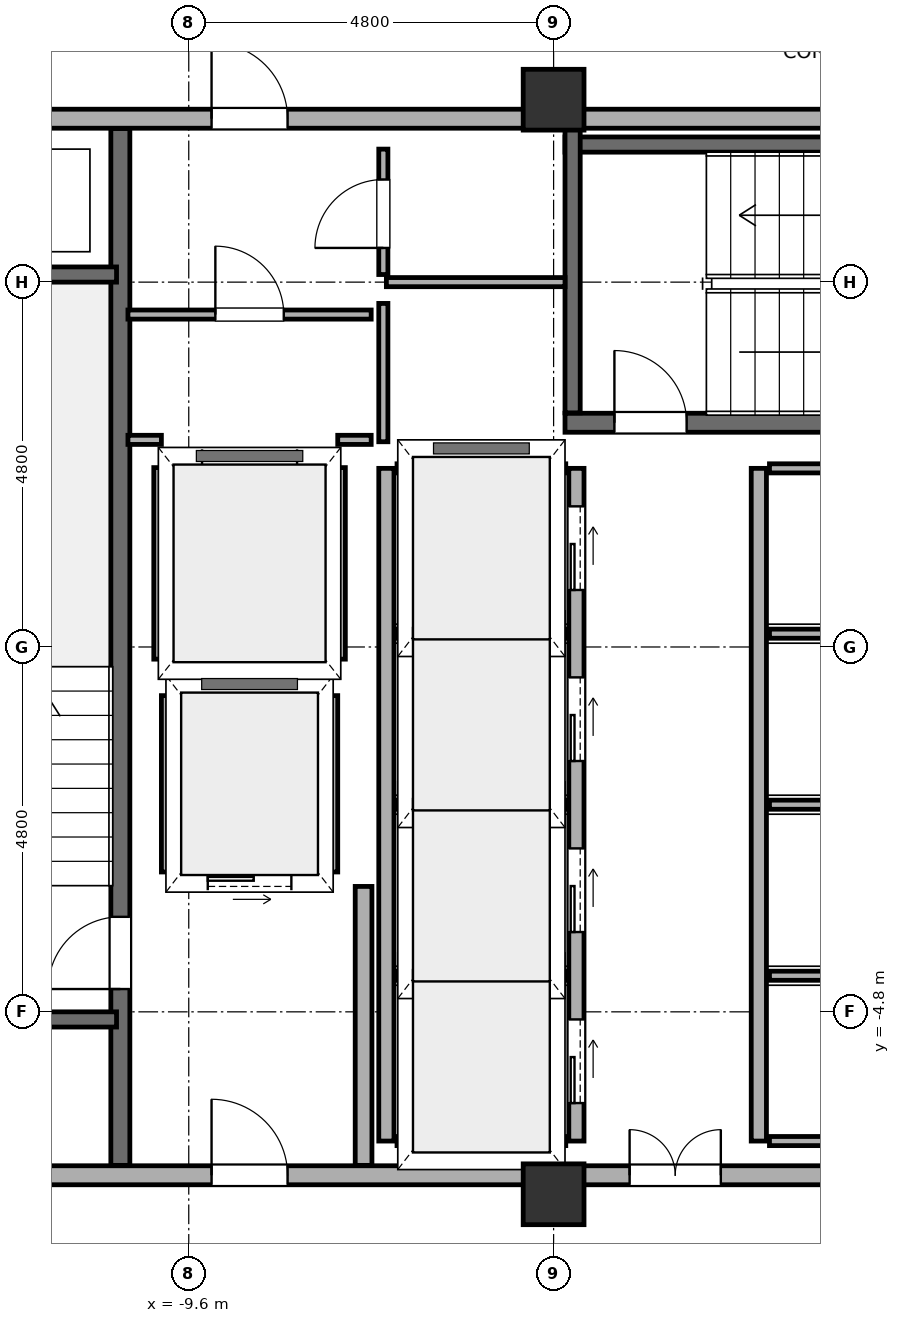
"""IFC4 building model, lengths in metres.
Left out: names, types, materials, properties, quantities, classifications, styles, units other than length and angle.
Written with IfcOpenShell. Run it as: python <this file> out.ifc"""

import sys

from ifc_helpers import new_model, si_unit, direction, frame, frame_2d, origin, origin_2d, place, context, subcontext, project, spatial, rectangle, hollow_rectangle, extrude, element, fill, save


model = new_model("IFC4")
c1 = context("Model", 3, precision=1e-05, world=origin(), true_north=direction((0.0, 1.0)))
c2 = subcontext(c1, "Body", "Model", "MODEL_VIEW")
j1 = project(units=[si_unit("LENGTHUNIT", "METRE"), si_unit("PLANEANGLEUNIT", "RADIAN")], contexts=[c1])
p1 = place(None, origin())
s1 = spatial("IfcSite", under=j1, at=p1, CompositionType="ELEMENT")
p2 = place(p1, origin())
s2 = spatial("IfcBuilding", under=s1, at=p2, CompositionType="ELEMENT")
p3 = place(p2, frame((0.0, 0.0, 85.5)))
s3 = spatial("IfcBuildingStorey", under=s2, at=p3, CompositionType="ELEMENT", Elevation=85.5)
for number, where, z_axis, x_axis in (
    (1, (-4.8, -7.2, 0.0), (0.0, 0.0, 1.0), (1.0, 0.0, 0.0)),
    (2, (-4.8, 7.2, 0.0), (0.0, 0.0, 1.0), (1.0, 0.0, 0.0)),
):
    element("IfcColumn", number, at=place(p3, frame(where, z_axis=z_axis, x_axis=x_axis)), inside=s3, PredefinedType="COLUMN", context=c2, shape_type="SweptSolid", body=[
        extrude(hollow_rectangle(XDim=0.8, YDim=0.8, WallThickness=0.036, at=origin_2d()), origin(), (0.0, 0.0, 1.0), 3.7),
    ])
p4 = place(p3, frame((-14.2, -6.95, 0.0), z_axis=(0.0, 0.0, 1.0), x_axis=(1.0, 0.0, 0.0)))
e3 = element("IfcWall", 3, at=p4, inside=s3, PredefinedType="SOLIDWALL", context=c2, shape_type="SweptSolid", body=[
    extrude(rectangle(XDim=9.4, YDim=0.25, at=frame_2d((4.7, 0.0))), origin(), (0.0, 0.0, 1.0), 2.05),
])
p5 = place(p4, frame((4.9, 0.0, 0.0)))
e4 = element("IfcOpeningElement", 4, at=p5, cuts=e3, PredefinedType="OPENING", context=c2, shape_type="SweptSolid", body=[
    extrude(rectangle(XDim=1.0, YDim=2.02, at=frame_2d((0.5, 1.01))), frame((0.0, 0.14, 0.0), z_axis=(0.0, -1.0, 0.0), x_axis=(1.0, 0.0, 0.0)), (0.0, 0.0, 1.0), 0.28),
])
p6 = place(p3, frame((-4.6, -6.95, 0.0), z_axis=(0.0, 0.0, 1.0), x_axis=(1.0, 0.0, 0.0)))
e5 = element("IfcWall", 5, at=p6, inside=s3, PredefinedType="SOLIDWALL", context=c2, shape_type="SweptSolid", body=[
    extrude(rectangle(XDim=9.2, YDim=0.25, at=frame_2d((4.6, 0.0))), origin(), (0.0, 0.0, 1.0), 2.25),
])
p7 = place(p6, frame((0.8, 0.0, 0.0)))
e6 = element("IfcOpeningElement", 6, at=p7, cuts=e5, PredefinedType="OPENING", context=c2, shape_type="SweptSolid", body=[
    extrude(rectangle(XDim=1.2, YDim=2.02, at=frame_2d((0.6, 1.01))), frame((0.0, 0.14, 0.0), z_axis=(0.0, -1.0, 0.0), x_axis=(1.0, 0.0, 0.0)), (0.0, 0.0, 1.0), 0.28),
])
p8 = place(p6, frame((5.55, 0.0, 0.0)))
e7 = element("IfcOpeningElement", 7, at=p8, cuts=e5, PredefinedType="OPENING", context=c2, shape_type="SweptSolid", body=[
    extrude(rectangle(XDim=1.2, YDim=2.02, at=frame_2d((0.6, 1.01))), frame((0.0, 0.14, 0.0), z_axis=(0.0, -1.0, 0.0), x_axis=(1.0, 0.0, 0.0)), (0.0, 0.0, 1.0), 0.28),
])
p9 = place(p3, frame((-14.2, 6.95, 0.0), z_axis=(0.0, 0.0, 1.0), x_axis=(1.0, 0.0, 0.0)))
e8 = element("IfcWall", 8, at=p9, inside=s3, PredefinedType="SOLIDWALL", context=c2, shape_type="SweptSolid", body=[
    extrude(rectangle(XDim=9.4, YDim=0.25, at=frame_2d((4.7, 0.0))), origin(), (0.0, 0.0, 1.0), 2.05),
])
p10 = place(p9, frame((4.9, 0.0, 0.0)))
e9 = element("IfcOpeningElement", 9, at=p10, cuts=e8, PredefinedType="OPENING", context=c2, shape_type="SweptSolid", body=[
    extrude(rectangle(XDim=1.0, YDim=2.02, at=frame_2d((0.5, 1.01))), frame((0.0, 0.14, 0.0), z_axis=(0.0, -1.0, 0.0), x_axis=(1.0, 0.0, 0.0)), (0.0, 0.0, 1.0), 0.28),
])
p11 = place(p3, frame((-4.6, 6.95, 0.0), z_axis=(0.0, 0.0, 1.0), x_axis=(1.0, 0.0, 0.0)))
e10 = element("IfcWall", 10, at=p11, inside=s3, PredefinedType="SOLIDWALL", context=c2, shape_type="SweptSolid", body=[
    extrude(rectangle(XDim=9.2, YDim=0.25, at=frame_2d((4.6, 0.0))), origin(), (0.0, 0.0, 1.0), 2.05),
])
p12 = place(p3, frame((-7.3, -6.82, 0.0), z_axis=(0.0, 0.0, 1.0), x_axis=(0.0, 1.0, 0.0)))
e11 = element("IfcWall", 11, at=p12, inside=s3, PredefinedType="SOLIDWALL", context=c2, shape_type="SweptSolid", body=[
    extrude(rectangle(XDim=3.67, YDim=0.22, at=frame_2d((1.835, 0.0))), origin(), (0.0, 0.0, 1.0), 2.05),
])
p13 = place(p3, frame((-10.5, -6.82, -0.18), z_axis=(0.0, 0.0, 1.0), x_axis=(0.0, 1.0, 0.0)))
e12 = element("IfcWall", 12, at=p13, inside=s3, PredefinedType="SOLIDWALL", context=c2, shape_type="SweptSolid", body=[
    extrude(rectangle(XDim=13.64, YDim=0.25, at=frame_2d((6.82, 0.0))), origin(), (0.0, 0.0, 1.0), 3.63),
])
p14 = place(p13, frame((2.32, 0.0, 0.18)))
e13 = element("IfcOpeningElement", 13, at=p14, cuts=e12, PredefinedType="OPENING", context=c2, shape_type="SweptSolid", body=[
    extrude(rectangle(XDim=0.95, YDim=2.15, at=frame_2d((0.475, 1.075))), frame((0.0, 0.14, 0.0), z_axis=(0.0, -1.0, 0.0), x_axis=(1.0, 0.0, 0.0)), (0.0, 0.0, 1.0), 0.28),
])
for number, where, z_axis, x_axis in (
    (14, (-14.2, -4.9, -0.18), (0.0, 0.0, 1.0), (1.0, 0.0, 0.0)),
    (15, (-14.2, 4.9, -0.18), (0.0, 0.0, 1.0), (1.0, 0.0, 0.0)),
):
    element("IfcWall", number, at=place(p3, frame(where, z_axis=z_axis, x_axis=x_axis)), inside=s3, PredefinedType="SOLIDWALL", context=c2, shape_type="SweptSolid", body=[
        extrude(rectangle(XDim=3.65, YDim=0.2, at=frame_2d((1.825, 0.0))), origin(), (0.0, 0.0, 1.0), 3.63),
    ])
p15 = place(p3, frame((-4.65, 2.95, -0.18), z_axis=(0.0, 0.0, 1.0), x_axis=(1.0, 0.0, 0.0)))
e16 = element("IfcWall", 16, at=p15, inside=s3, PredefinedType="SOLIDWALL", context=c2, shape_type="SweptSolid", body=[
    extrude(rectangle(XDim=9.9, YDim=0.25, at=frame_2d((4.95, 0.0))), origin(), (0.0, 0.0, 1.0), 3.63),
])
p16 = place(p15, frame((0.65, 0.0, 0.18)))
e17 = element("IfcOpeningElement", 17, at=p16, cuts=e16, PredefinedType="OPENING", context=c2, shape_type="SweptSolid", body=[
    extrude(rectangle(XDim=0.95, YDim=2.15, at=frame_2d((0.475, 1.075))), frame((0.0, 0.14, 0.0), z_axis=(0.0, -1.0, 0.0), x_axis=(1.0, 0.0, 0.0)), (0.0, 0.0, 1.0), 0.28),
])
p17 = place(p3, frame((-4.65, 6.61, -0.18), z_axis=(0.0, 0.0, 1.0), x_axis=(1.0, 0.0, 0.0)))
e18 = element("IfcWall", 18, at=p17, inside=s3, PredefinedType="SOLIDWALL", context=c2, shape_type="SweptSolid", body=[
    extrude(rectangle(XDim=9.9, YDim=0.2, at=frame_2d((4.95, 0.0))), origin(), (0.0, 0.0, 1.0), 3.63),
])
p18 = place(p3, frame((-4.55, 3.08, -0.18), z_axis=(0.0, 0.0, 1.0), x_axis=(0.0, 1.0, 0.0)))
e19 = element("IfcWall", 19, at=p18, inside=s3, PredefinedType="SOLIDWALL", context=c2, shape_type="SweptSolid", body=[
    extrude(rectangle(XDim=3.74, YDim=0.2, at=frame_2d((1.87, 0.0))), origin(), (0.0, 0.0, 1.0), 3.63),
])
p19 = place(p3, frame((-4.5, -6.5, 0.0), z_axis=(0.0, 0.0, 1.0), x_axis=(0.0, 1.0, 0.0)))
e20 = element("IfcWall", 20, at=p19, inside=s3, PredefinedType="SOLIDWALL", context=c2, shape_type="SweptSolid", body=[
    extrude(rectangle(XDim=8.85, YDim=0.2, at=frame_2d((4.425, 0.0))), origin(), (0.0, 0.0, 1.0), 3.45),
])
p20 = place(p19, frame((0.5, 0.0, 0.0)))
e21 = element("IfcOpeningElement", 21, at=p20, cuts=e20, PredefinedType="OPENING", context=c2, shape_type="SweptSolid", body=[
    extrude(rectangle(XDim=1.1, YDim=2.2, at=frame_2d((0.55, 1.1))), frame((0.0, 0.115, 0.0), z_axis=(0.0, -1.0, 0.0), x_axis=(1.0, 0.0, 0.0)), (0.0, 0.0, 1.0), 0.23),
])
p21 = place(p19, frame((2.75, 0.0, 0.0)))
e22 = element("IfcOpeningElement", 22, at=p21, cuts=e20, PredefinedType="OPENING", context=c2, shape_type="SweptSolid", body=[
    extrude(rectangle(XDim=1.1, YDim=2.2, at=frame_2d((0.55, 1.1))), frame((0.0, 0.115, 0.0), z_axis=(0.0, -1.0, 0.0), x_axis=(1.0, 0.0, 0.0)), (0.0, 0.0, 1.0), 0.23),
])
p22 = place(p19, frame((5.0, 0.0, 0.0)))
e23 = element("IfcOpeningElement", 23, at=p22, cuts=e20, PredefinedType="OPENING", context=c2, shape_type="SweptSolid", body=[
    extrude(rectangle(XDim=1.1, YDim=2.2, at=frame_2d((0.55, 1.1))), frame((0.0, 0.115, 0.0), z_axis=(0.0, -1.0, 0.0), x_axis=(1.0, 0.0, 0.0)), (0.0, 0.0, 1.0), 0.23),
])
p23 = place(p19, frame((7.25, 0.0, 0.0)))
e24 = element("IfcOpeningElement", 24, at=p23, cuts=e20, PredefinedType="OPENING", context=c2, shape_type="SweptSolid", body=[
    extrude(rectangle(XDim=1.1, YDim=2.2, at=frame_2d((0.55, 1.1))), frame((0.0, 0.115, 0.0), z_axis=(0.0, -1.0, 0.0), x_axis=(1.0, 0.0, 0.0)), (0.0, 0.0, 1.0), 0.23),
])
p24 = place(p3, frame((-7.0, -6.5, 0.0), z_axis=(0.0, 0.0, 1.0), x_axis=(0.0, 1.0, 0.0)))
e25 = element("IfcWall", 25, at=p24, inside=s3, PredefinedType="SOLIDWALL", context=c2, shape_type="SweptSolid", body=[
    extrude(rectangle(XDim=8.85, YDim=0.2, at=frame_2d((4.425, 0.0))), origin(), (0.0, 0.0, 1.0), 3.45),
])
for number, where, z_axis, x_axis in (
    (26, (-6.86, -6.5, 0.0), (0.0, 0.0, 1.0), (1.0, 0.0, 0.0)),
    (27, (-6.86, -4.325, 0.0), (0.0, 0.0, 1.0), (1.0, 0.0, 0.0)),
    (28, (-6.86, -2.075, 0.0), (0.0, 0.0, 1.0), (1.0, 0.0, 0.0)),
    (29, (-6.86, 0.175, 0.0), (0.0, 0.0, 1.0), (1.0, 0.0, 0.0)),
    (30, (-6.86, 2.35, 0.0), (0.0, 0.0, 1.0), (1.0, 0.0, 0.0)),
):
    element("IfcWall", number, at=place(p3, frame(where, z_axis=z_axis, x_axis=x_axis)), inside=s3, PredefinedType="PARTITIONING", context=c2, shape_type="SweptSolid", body=[
        extrude(rectangle(XDim=2.22, YDim=0.12, at=frame_2d((1.11, 0.0))), origin(), (0.0, 0.0, 1.0), 3.45),
    ])
p25 = place(p3, frame((-2.1, -6.5, 0.0), z_axis=(0.0, 0.0, 1.0), x_axis=(0.0, 1.0, 0.0)))
e31 = element("IfcWall", 31, at=p25, inside=s3, PredefinedType="SOLIDWALL", context=c2, shape_type="SweptSolid", body=[
    extrude(rectangle(XDim=8.85, YDim=0.2, at=frame_2d((4.425, 0.0))), origin(), (0.0, 0.0, 1.0), 3.45),
])
for number, where, z_axis, x_axis in (
    (32, (-1.96, -6.5, 0.0), (0.0, 0.0, 1.0), (1.0, 0.0, 0.0)),
    (33, (-1.96, -4.325, 0.0), (0.0, 0.0, 1.0), (1.0, 0.0, 0.0)),
    (34, (-1.96, -2.075, 0.0), (0.0, 0.0, 1.0), (1.0, 0.0, 0.0)),
    (35, (-1.96, 0.175, 0.0), (0.0, 0.0, 1.0), (1.0, 0.0, 0.0)),
    (36, (-1.96, 2.35, 0.0), (0.0, 0.0, 1.0), (1.0, 0.0, 0.0)),
):
    element("IfcWall", number, at=place(p3, frame(where, z_axis=z_axis, x_axis=x_axis)), inside=s3, PredefinedType="PARTITIONING", context=c2, shape_type="SweptSolid", body=[
        extrude(rectangle(XDim=2.22, YDim=0.12, at=frame_2d((1.11, 0.0))), origin(), (0.0, 0.0, 1.0), 3.45),
    ])
p26 = place(p3, frame((-9.82, -3.1, 0.0), z_axis=(0.0, 0.0, 1.0), x_axis=(1.0, 0.0, 0.0)))
e37 = element("IfcWall", 37, at=p26, inside=s3, PredefinedType="SOLIDWALL", context=c2, shape_type="SweptSolid", body=[
    extrude(rectangle(XDim=2.04, YDim=0.2, at=frame_2d((1.02, 0.0))), origin(), (0.0, 0.0, 1.0), 3.45),
])
p27 = place(p26, frame((0.47, 0.0, 0.0)))
e38 = element("IfcOpeningElement", 38, at=p27, cuts=e37, PredefinedType="OPENING", context=c2, shape_type="SweptSolid", body=[
    extrude(rectangle(XDim=1.1, YDim=2.2, at=frame_2d((0.55, 1.1))), frame((0.0, 0.115, 0.0), z_axis=(0.0, -1.0, 0.0), x_axis=(1.0, 0.0, 0.0)), (0.0, 0.0, 1.0), 0.23),
])
p28 = place(p3, frame((-9.82, -0.5, 0.0), z_axis=(0.0, 0.0, 1.0), x_axis=(1.0, 0.0, 0.0)))
e39 = element("IfcWall", 39, at=p28, inside=s3, PredefinedType="SOLIDWALL", context=c2, shape_type="SweptSolid", body=[
    extrude(rectangle(XDim=2.04, YDim=0.2, at=frame_2d((1.02, 0.0))), origin(), (0.0, 0.0, 1.0), 3.45),
])
for number, where, z_axis, x_axis in (
    (40, (-9.9, -2.96, 0.0), (0.0, 0.0, 1.0), (0.0, 1.0, 0.0)),
    (41, (-7.7, -2.96, 0.0), (0.0, 0.0, 1.0), (0.0, 1.0, 0.0)),
):
    element("IfcWall", number, at=place(p3, frame(where, z_axis=z_axis, x_axis=x_axis)), inside=s3, PredefinedType="PARTITIONING", context=c2, shape_type="SweptSolid", body=[
        extrude(rectangle(XDim=2.32, YDim=0.12, at=frame_2d((1.16, 0.0))), origin(), (0.0, 0.0, 1.0), 3.45),
    ])
p29 = place(p3, frame((-9.92, 2.5, 0.0), z_axis=(0.0, 0.0, 1.0), x_axis=(1.0, 0.0, 0.0)))
e42 = element("IfcWall", 42, at=p29, inside=s3, PredefinedType="SOLIDWALL", context=c2, shape_type="SweptSolid", body=[
    extrude(rectangle(XDim=2.24, YDim=0.2, at=frame_2d((1.12, 0.0))), origin(), (0.0, 0.0, 1.0), 3.45),
])
p30 = place(p29, frame((0.495, 0.0, 0.0)))
e43 = element("IfcOpeningElement", 43, at=p30, cuts=e42, PredefinedType="OPENING", context=c2, shape_type="SweptSolid", body=[
    extrude(rectangle(XDim=1.25, YDim=2.25, at=frame_2d((0.625, 1.125))), frame((0.0, 0.115, 0.0), z_axis=(0.0, -1.0, 0.0), x_axis=(1.0, 0.0, 0.0)), (0.0, 0.0, 1.0), 0.23),
])
p31 = place(p3, frame((-9.92, -0.3, 0.0), z_axis=(0.0, 0.0, 1.0), x_axis=(1.0, 0.0, 0.0)))
e44 = element("IfcWall", 44, at=p31, inside=s3, PredefinedType="SOLIDWALL", context=c2, shape_type="SweptSolid", body=[
    extrude(rectangle(XDim=2.24, YDim=0.2, at=frame_2d((1.12, 0.0))), origin(), (0.0, 0.0, 1.0), 3.45),
])
for number, where, z_axis, x_axis in (
    (45, (-10.0, -0.16, 0.0), (0.0, 0.0, 1.0), (0.0, 1.0, 0.0)),
    (46, (-7.6, -0.16, 0.0), (0.0, 0.0, 1.0), (0.0, 1.0, 0.0)),
):
    element("IfcWall", number, at=place(p3, frame(where, z_axis=z_axis, x_axis=x_axis)), inside=s3, PredefinedType="PARTITIONING", context=c2, shape_type="SweptSolid", body=[
        extrude(rectangle(XDim=2.52, YDim=0.12, at=frame_2d((1.26, 0.0))), origin(), (0.0, 0.0, 1.0), 3.45),
    ])
for number, where, z_axis, x_axis in (
    (47, (-10.4, 2.725, 0.0), (0.0, 0.0, 1.0), (1.0, 0.0, 0.0)),
    (48, (-7.64, 2.725, 0.0), (0.0, 0.0, 1.0), (1.0, 0.0, 0.0)),
):
    element("IfcWall", number, at=place(p3, frame(where, z_axis=z_axis, x_axis=x_axis)), inside=s3, PredefinedType="PARTITIONING", context=c2, shape_type="SweptSolid", body=[
        extrude(rectangle(XDim=0.44, YDim=0.12, at=frame_2d((0.22, 0.0))), origin(), (0.0, 0.0, 1.0), 3.45),
    ])
p32 = place(p3, frame((-10.4, 4.373, 0.0), z_axis=(0.0, 0.0, 1.0), x_axis=(1.0, 0.0, 0.0)))
e49 = element("IfcWall", 49, at=p32, inside=s3, PredefinedType="PARTITIONING", context=c2, shape_type="SweptSolid", body=[
    extrude(rectangle(XDim=3.2, YDim=0.12, at=frame_2d((1.6, 0.0))), origin(), (0.0, 0.0, 1.0), 3.45),
])
p33 = place(p32, frame((1.15, 0.0, 0.0)))
e50 = element("IfcOpeningElement", 50, at=p33, cuts=e49, PredefinedType="OPENING", context=c2, shape_type="SweptSolid", body=[
    extrude(rectangle(XDim=0.9, YDim=2.1, at=frame_2d((0.45, 1.05))), frame((0.0, 0.075, 0.0), z_axis=(0.0, -1.0, 0.0), x_axis=(1.0, 0.0, 0.0)), (0.0, 0.0, 1.0), 0.15),
])
p34 = place(p3, frame((-7.0, 4.8, 0.0), z_axis=(0.0, 0.0, 1.0), x_axis=(1.0, 0.0, 0.0)))
e51 = element("IfcWall", 51, at=p34, inside=s3, PredefinedType="PARTITIONING", context=c2, shape_type="SweptSolid", body=[
    extrude(rectangle(XDim=2.35, YDim=0.12, at=frame_2d((1.175, 0.0))), origin(), (0.0, 0.0, 1.0), 3.45),
])
p35 = place(p3, frame((-7.04, 2.7, 0.0), z_axis=(0.0, 0.0, 1.0), x_axis=(0.0, 1.0, 0.0)))
e52 = element("IfcWall", 52, at=p35, inside=s3, PredefinedType="PARTITIONING", context=c2, shape_type="SweptSolid", body=[
    extrude(rectangle(XDim=1.82, YDim=0.12, at=frame_2d((0.91, 0.0))), origin(), (0.0, 0.0, 1.0), 3.45),
])
p36 = place(p3, frame((-7.04, 4.9, 0.0), z_axis=(0.0, 0.0, 1.0), x_axis=(0.0, 1.0, 0.0)))
e53 = element("IfcWall", 53, at=p36, inside=s3, PredefinedType="PARTITIONING", context=c2, shape_type="SweptSolid", body=[
    extrude(rectangle(XDim=1.65, YDim=0.12, at=frame_2d((0.825, 0.0))), origin(), (0.0, 0.0, 1.0), 3.45),
])
p37 = place(p36, frame((0.35, 0.0, 0.0)))
e54 = element("IfcOpeningElement", 54, at=p37, cuts=e53, PredefinedType="OPENING", context=c2, shape_type="SweptSolid", body=[
    extrude(rectangle(XDim=0.9, YDim=2.1, at=frame_2d((0.45, 1.05))), frame((0.0, 0.075, 0.0), z_axis=(0.0, -1.0, 0.0), x_axis=(1.0, 0.0, 0.0)), (0.0, 0.0, 1.0), 0.15),
])
p38 = place(p5, origin())
e55 = element("IfcDoor", 55, at=p38, inside=s3, OperationType="SINGLE_SWING_LEFT", PredefinedType="DOOR", context=c2, shape_type="SweptSolid", body=[
    extrude(rectangle(XDim=1.0, YDim=2.02, at=frame_2d((0.5, 1.01))), frame((0.0, 0.025, 0.0), z_axis=(0.0, -1.0, 0.0), x_axis=(1.0, 0.0, 0.0)), (0.0, 0.0, 1.0), 0.05),
])
fill(e4, e55)
p39 = place(p7, origin())
e56 = element("IfcDoor", 56, at=p39, inside=s3, OperationType="DOUBLE_DOOR_SINGLE_SWING", PredefinedType="DOOR", context=c2, shape_type="SweptSolid", body=[
    extrude(rectangle(XDim=1.2, YDim=2.02, at=frame_2d((0.6, 1.01))), frame((0.0, 0.025, 0.0), z_axis=(0.0, -1.0, 0.0), x_axis=(1.0, 0.0, 0.0)), (0.0, 0.0, 1.0), 0.05),
])
fill(e6, e56)
p40 = place(p10, origin())
e57 = element("IfcDoor", 57, at=p40, inside=s3, OperationType="SINGLE_SWING_RIGHT", PredefinedType="DOOR", context=c2, shape_type="SweptSolid", body=[
    extrude(rectangle(XDim=1.0, YDim=2.02, at=frame_2d((0.5, 1.01))), frame((0.0, 0.025, 0.0), z_axis=(0.0, -1.0, 0.0), x_axis=(1.0, 0.0, 0.0)), (0.0, 0.0, 1.0), 0.05),
])
fill(e9, e57)
p41 = place(p14, origin())
e58 = element("IfcDoor", 58, at=p41, inside=s3, OperationType="SINGLE_SWING_RIGHT", PredefinedType="DOOR", context=c2, shape_type="SweptSolid", body=[
    extrude(rectangle(XDim=0.95, YDim=2.15, at=frame_2d((0.475, 1.075))), frame((0.0, 0.025, 0.0), z_axis=(0.0, -1.0, 0.0), x_axis=(1.0, 0.0, 0.0)), (0.0, 0.0, 1.0), 0.05),
])
fill(e13, e58)
p42 = place(p16, origin())
e59 = element("IfcDoor", 59, at=p42, inside=s3, OperationType="SINGLE_SWING_RIGHT", PredefinedType="DOOR", context=c2, shape_type="SweptSolid", body=[
    extrude(rectangle(XDim=0.95, YDim=2.15, at=frame_2d((0.475, 1.075))), frame((0.0, 0.025, 0.0), z_axis=(0.0, -1.0, 0.0), x_axis=(1.0, 0.0, 0.0)), (0.0, 0.0, 1.0), 0.05),
])
fill(e17, e59)
p43 = place(p20, origin())
e60 = element("IfcDoor", 60, at=p43, inside=s3, OperationType="SLIDING_TO_LEFT", PredefinedType="DOOR", context=c2, shape_type="SweptSolid", body=[
    extrude(rectangle(XDim=1.1, YDim=2.2, at=frame_2d((0.55, 1.1))), frame((0.0, 0.025, 0.0), z_axis=(0.0, -1.0, 0.0), x_axis=(1.0, 0.0, 0.0)), (0.0, 0.0, 1.0), 0.05),
])
fill(e21, e60)
p44 = place(p21, origin())
e61 = element("IfcDoor", 61, at=p44, inside=s3, OperationType="SLIDING_TO_LEFT", PredefinedType="DOOR", context=c2, shape_type="SweptSolid", body=[
    extrude(rectangle(XDim=1.1, YDim=2.2, at=frame_2d((0.55, 1.1))), frame((0.0, 0.025, 0.0), z_axis=(0.0, -1.0, 0.0), x_axis=(1.0, 0.0, 0.0)), (0.0, 0.0, 1.0), 0.05),
])
fill(e22, e61)
p45 = place(p22, origin())
e62 = element("IfcDoor", 62, at=p45, inside=s3, OperationType="SLIDING_TO_LEFT", PredefinedType="DOOR", context=c2, shape_type="SweptSolid", body=[
    extrude(rectangle(XDim=1.1, YDim=2.2, at=frame_2d((0.55, 1.1))), frame((0.0, 0.025, 0.0), z_axis=(0.0, -1.0, 0.0), x_axis=(1.0, 0.0, 0.0)), (0.0, 0.0, 1.0), 0.05),
])
fill(e23, e62)
p46 = place(p23, origin())
e63 = element("IfcDoor", 63, at=p46, inside=s3, OperationType="SLIDING_TO_LEFT", PredefinedType="DOOR", context=c2, shape_type="SweptSolid", body=[
    extrude(rectangle(XDim=1.1, YDim=2.2, at=frame_2d((0.55, 1.1))), frame((0.0, 0.025, 0.0), z_axis=(0.0, -1.0, 0.0), x_axis=(1.0, 0.0, 0.0)), (0.0, 0.0, 1.0), 0.05),
])
fill(e24, e63)
p47 = place(p27, origin())
e64 = element("IfcDoor", 64, at=p47, inside=s3, OperationType="SLIDING_TO_LEFT", PredefinedType="DOOR", context=c2, shape_type="SweptSolid", body=[
    extrude(rectangle(XDim=1.1, YDim=2.2, at=frame_2d((0.55, 1.1))), frame((0.0, 0.025, 0.0), z_axis=(0.0, -1.0, 0.0), x_axis=(1.0, 0.0, 0.0)), (0.0, 0.0, 1.0), 0.05),
])
fill(e38, e64)
p48 = place(p30, origin())
e65 = element("IfcDoor", 65, at=p48, inside=s3, OperationType="SLIDING_TO_LEFT", PredefinedType="DOOR", context=c2, shape_type="SweptSolid", body=[
    extrude(rectangle(XDim=1.25, YDim=2.25, at=frame_2d((0.625, 1.125))), frame((0.0, 0.025, 0.0), z_axis=(0.0, -1.0, 0.0), x_axis=(1.0, 0.0, 0.0)), (0.0, 0.0, 1.0), 0.05),
])
fill(e43, e65)
p49 = place(p33, origin())
e66 = element("IfcDoor", 66, at=p49, inside=s3, OperationType="SINGLE_SWING_RIGHT", PredefinedType="DOOR", context=c2, shape_type="SweptSolid", body=[
    extrude(rectangle(XDim=0.9, YDim=2.1, at=frame_2d((0.45, 1.05))), frame((0.0, 0.025, 0.0), z_axis=(0.0, -1.0, 0.0), x_axis=(1.0, 0.0, 0.0)), (0.0, 0.0, 1.0), 0.05),
])
fill(e50, e66)
p50 = place(p37, origin())
e67 = element("IfcDoor", 67, at=p50, inside=s3, OperationType="SINGLE_SWING_RIGHT", PredefinedType="DOOR", context=c2, shape_type="SweptSolid", body=[
    extrude(rectangle(XDim=0.9, YDim=2.1, at=frame_2d((0.45, 1.05))), frame((0.0, 0.025, 0.0), z_axis=(0.0, -1.0, 0.0), x_axis=(1.0, 0.0, 0.0)), (0.0, 0.0, 1.0), 0.05),
])
fill(e54, e67)
save(model, sys.argv[1])
